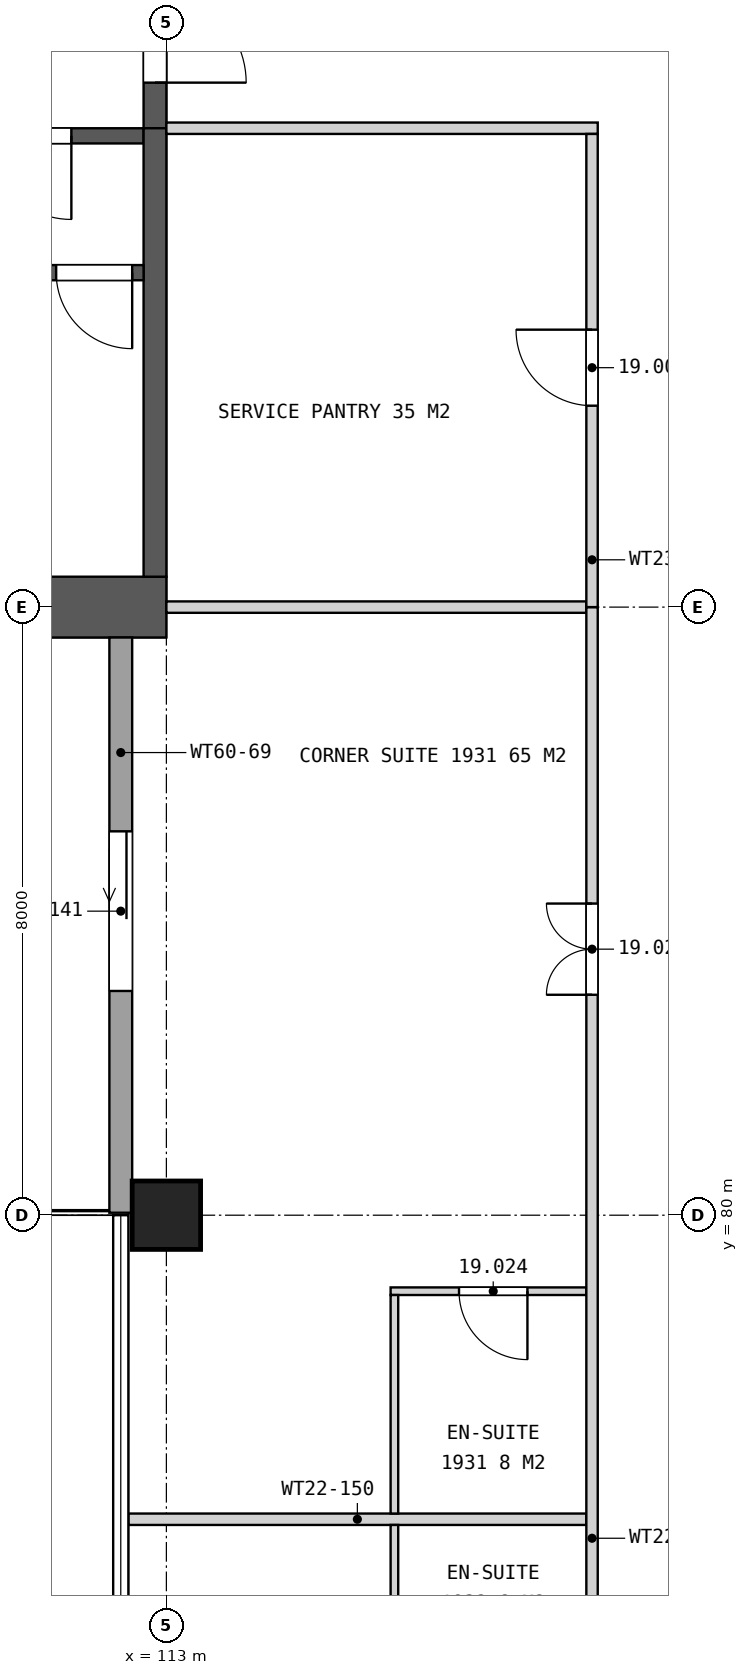
"""IFC4 building model, lengths in metres.
Left out: names, types, materials, properties, quantities, classifications, styles, units other than length and angle.
Written with IfcOpenShell. Run it as: python <this file> out.ifc"""

import sys

from ifc_helpers import new_model, si_unit, direction, frame, frame_2d, origin, origin_2d, place, context, subcontext, project, spatial, rectangle, extrude, element, fill, save


model = new_model("IFC4")
c1 = context("Model", 3, precision=1e-05, world=origin(), true_north=direction((0.0, 1.0)))
c2 = subcontext(c1, "Body", "Model", "MODEL_VIEW")
j1 = project(units=[si_unit("LENGTHUNIT", "METRE"), si_unit("PLANEANGLEUNIT", "RADIAN")], contexts=[c1])
p1 = place(None, origin())
s1 = spatial("IfcSite", under=j1, at=p1, CompositionType="ELEMENT")
p2 = place(p1, origin())
s2 = spatial("IfcBuilding", under=s1, at=p2, CompositionType="ELEMENT")
p3 = place(p2, frame((0.0, 0.0, 97.9)))
s3 = spatial("IfcBuildingStorey", under=s2, at=p3, CompositionType="ELEMENT", Elevation=97.9)
p4 = place(p3, frame((113.0, 80.0, 0.0), z_axis=(0.0, 0.0, 1.0), x_axis=(1.0, 0.0, 0.0)))
e1 = element("IfcColumn", 1, at=p4, inside=s3, PredefinedType="COLUMN", context=c2, shape_type="SweptSolid", body=[
    extrude(rectangle(XDim=0.9, YDim=0.9, at=origin_2d()), origin(), (0.0, 0.0, 1.0), 3.7),
])
p5 = place(p3, frame((113.0, 88.0, 0.0), z_axis=(0.0, 0.0, 1.0), x_axis=(-1.0, 0.0, 0.0)))
e2 = element("IfcWall", 2, at=p5, inside=s3, PredefinedType="SHEAR", context=c2, shape_type="SweptSolid", body=[
    extrude(rectangle(XDim=7.1, YDim=0.8, at=frame_2d((3.55, 0.0))), origin(), (0.0, 0.0, 1.0), 3.7),
])
p6 = place(p3, frame((112.85, 105.7, 0.0), z_axis=(0.0, 0.0, 1.0), x_axis=(0.0, -1.0, 0.0)))
e3 = element("IfcWall", 3, at=p6, inside=s3, PredefinedType="SHEAR", context=c2, shape_type="SweptSolid", body=[
    extrude(rectangle(XDim=11.4, YDim=0.3, at=frame_2d((5.7, 0.0))), origin(), (0.0, 0.0, 1.0), 3.7),
])
p7 = place(p6, frame((0.6, 0.0, 0.0)))
e4 = element("IfcOpeningElement", 4, at=p7, cuts=e3, PredefinedType="OPENING", context=c2, shape_type="SweptSolid", body=[
    extrude(rectangle(XDim=2.4, YDim=2.4, at=frame_2d((1.2, 1.2))), frame((0.0, 0.16, 0.0), z_axis=(0.0, -1.0, 0.0), x_axis=(1.0, 0.0, 0.0)), (0.0, 0.0, 1.0), 0.32),
])
p8 = place(p6, frame((4.5, 0.0, 0.0)))
e5 = element("IfcOpeningElement", 5, at=p8, cuts=e3, PredefinedType="OPENING", context=c2, shape_type="SweptSolid", body=[
    extrude(rectangle(XDim=2.4, YDim=2.4, at=frame_2d((1.2, 1.2))), frame((0.0, 0.16, 0.0), z_axis=(0.0, -1.0, 0.0), x_axis=(1.0, 0.0, 0.0)), (0.0, 0.0, 1.0), 0.32),
])
p9 = place(p6, frame((8.4, 0.0, 0.0)))
e6 = element("IfcOpeningElement", 6, at=p9, cuts=e3, PredefinedType="OPENING", context=c2, shape_type="SweptSolid", body=[
    extrude(rectangle(XDim=2.4, YDim=2.4, at=frame_2d((1.2, 1.2))), frame((0.0, 0.16, 0.0), z_axis=(0.0, -1.0, 0.0), x_axis=(1.0, 0.0, 0.0)), (0.0, 0.0, 1.0), 0.32),
])
p10 = place(p3, frame((112.7, 94.2, 0.0), z_axis=(0.0, 0.0, 1.0), x_axis=(-1.0, 0.0, 0.0)))
e7 = element("IfcWall", 7, at=p10, inside=s3, PredefinedType="SHEAR", context=c2, shape_type="SweptSolid", body=[
    extrude(rectangle(XDim=15.3, YDim=0.2, at=frame_2d((7.65, 0.0))), origin(), (0.0, 0.0, 1.0), 3.7),
])
p11 = place(p10, frame((0.95, 0.0, 0.0)))
e8 = element("IfcOpeningElement", 8, at=p11, cuts=e7, PredefinedType="OPENING", context=c2, shape_type="SweptSolid", body=[
    extrude(rectangle(XDim=1.1, YDim=2.1, at=frame_2d((0.55, 1.05))), frame((0.0, 0.11, 0.0), z_axis=(0.0, -1.0, 0.0), x_axis=(1.0, 0.0, 0.0)), (0.0, 0.0, 1.0), 0.22),
])
p12 = place(p3, frame((112.85, 94.3, 0.0), z_axis=(0.0, 0.0, 1.0), x_axis=(0.0, -1.0, 0.0)))
e9 = element("IfcWall", 9, at=p12, inside=s3, PredefinedType="SHEAR", context=c2, shape_type="SweptSolid", body=[
    extrude(rectangle(XDim=5.9, YDim=0.3, at=frame_2d((2.95, 0.0))), origin(), (0.0, 0.0, 1.0), 3.7),
])
p13 = place(p3, frame((112.7, 92.4, 0.0), z_axis=(0.0, 0.0, 1.0), x_axis=(-1.0, 0.0, 0.0)))
e10 = element("IfcWall", 10, at=p13, inside=s3, PredefinedType="SHEAR", context=c2, shape_type="SweptSolid", body=[
    extrude(rectangle(XDim=6.8, YDim=0.2, at=frame_2d((3.4, 0.0))), origin(), (0.0, 0.0, 1.0), 3.7),
])
p14 = place(p13, frame((0.15, 0.0, 0.0)))
e11 = element("IfcOpeningElement", 11, at=p14, cuts=e10, PredefinedType="OPENING", context=c2, shape_type="SweptSolid", body=[
    extrude(rectangle(XDim=1.0, YDim=2.1, at=frame_2d((0.5, 1.05))), frame((0.0, 0.11, 0.0), z_axis=(0.0, -1.0, 0.0), x_axis=(1.0, 0.0, 0.0)), (0.0, 0.0, 1.0), 0.22),
])
p15 = place(p3, frame((112.4, 87.6, 0.0), z_axis=(0.0, 0.0, 1.0), x_axis=(0.0, -1.0, 0.0)))
e12 = element("IfcWall", 12, at=p15, inside=s3, PredefinedType="SOLIDWALL", context=c2, shape_type="SweptSolid", body=[
    extrude(rectangle(XDim=7.568, YDim=0.3, at=frame_2d((3.784, 0.0))), origin(), (0.0, 0.0, 1.0), 3.42),
])
p16 = place(p15, frame((2.55, 0.0, 0.0)))
e13 = element("IfcOpeningElement", 13, at=p16, cuts=e12, PredefinedType="OPENING", context=c2, shape_type="SweptSolid", body=[
    extrude(rectangle(XDim=2.1, YDim=2.4, at=frame_2d((1.05, 1.2))), frame((0.0, 0.16, 0.0), z_axis=(0.0, -1.0, 0.0), x_axis=(1.0, 0.0, 0.0)), (0.0, 0.0, 1.0), 0.32),
])
p17 = place(p3, frame((112.5, 76.0, 0.0), z_axis=(0.0, 0.0, 1.0), x_axis=(1.0, 0.0, 0.0)))
e14 = element("IfcWall", 14, at=p17, inside=s3, PredefinedType="PARTITIONING", context=c2, shape_type="SweptSolid", body=[
    extrude(rectangle(XDim=6.025, YDim=0.15, at=frame_2d((3.012, 0.0))), origin(), (0.0, 0.0, 1.0), 2.963),
])
p18 = place(p3, frame((115.95, 79.0, 0.0), z_axis=(0.0, 0.0, 1.0), x_axis=(1.0, 0.0, 0.0)))
e15 = element("IfcWall", 15, at=p18, inside=s3, PredefinedType="PLUMBINGWALL", context=c2, shape_type="SweptSolid", body=[
    extrude(rectangle(XDim=2.575, YDim=0.1, at=frame_2d((1.288, 0.0))), origin(), (0.0, 0.0, 1.0), 3.7),
])
p19 = place(p18, frame((0.9, 0.0, 0.0)))
e16 = element("IfcOpeningElement", 16, at=p19, cuts=e15, PredefinedType="OPENING", context=c2, shape_type="SweptSolid", body=[
    extrude(rectangle(XDim=0.9, YDim=2.1, at=frame_2d((0.45, 1.05))), frame((0.0, 0.06, 0.0), z_axis=(0.0, -1.0, 0.0), x_axis=(1.0, 0.0, 0.0)), (0.0, 0.0, 1.0), 0.12),
])
p20 = place(p3, frame((113.0, 88.0, 0.0), z_axis=(0.0, 0.0, 1.0), x_axis=(1.0, 0.0, 0.0)))
e17 = element("IfcWall", 17, at=p20, inside=s3, PredefinedType="PARTITIONING", context=c2, shape_type="SweptSolid", body=[
    extrude(rectangle(XDim=5.525, YDim=0.15, at=frame_2d((2.762, 0.0))), origin(), (0.0, 0.0, 1.0), 2.957),
])
p21 = place(p3, frame((113.0, 94.3, 0.0), z_axis=(0.0, 0.0, 1.0), x_axis=(1.0, 0.0, 0.0)))
e18 = element("IfcWall", 18, at=p21, inside=s3, PredefinedType="PARTITIONING", context=c2, shape_type="SweptSolid", body=[
    extrude(rectangle(XDim=5.675, YDim=0.15, at=frame_2d((2.837, 0.0))), origin(), (0.0, 0.0, 1.0), 3.7),
])
for number, where, z_axis, x_axis in (
    (19, (116.0, 73.05, 0.0), (0.0, 0.0, 1.0), (0.0, 1.0, 0.0)),
    (20, (116.0, 76.075, 0.0), (0.0, 0.0, 1.0), (0.0, 1.0, 0.0)),
):
    element("IfcWall", number, at=place(p3, frame(where, z_axis=z_axis, x_axis=x_axis)), inside=s3, PredefinedType="PLUMBINGWALL", context=c2, shape_type="SweptSolid", body=[
        extrude(rectangle(XDim=2.875, YDim=0.1, at=frame_2d((1.438, 0.0))), origin(), (0.0, 0.0, 1.0), 3.7),
    ])
p22 = place(p3, frame((118.6, 63.5, 0.0), z_axis=(0.0, 0.0, 1.0), x_axis=(0.0, 1.0, 0.0)))
e21 = element("IfcWall", 21, at=p22, inside=s3, PredefinedType="PARTITIONING", context=c2, shape_type="SweptSolid", body=[
    extrude(rectangle(XDim=24.5, YDim=0.15, at=frame_2d((12.25, 0.0))), origin(), (0.0, 0.0, 1.0), 2.957),
])
p23 = place(p22, frame((19.4, 0.0, 0.0)))
e22 = element("IfcOpeningElement", 22, at=p23, cuts=e21, PredefinedType="OPENING", context=c2, shape_type="SweptSolid", body=[
    extrude(rectangle(XDim=1.2, YDim=2.2, at=frame_2d((0.6, 1.1))), frame((0.0, 0.085, 0.0), z_axis=(0.0, -1.0, 0.0), x_axis=(1.0, 0.0, 0.0)), (0.0, 0.0, 1.0), 0.17),
])
p24 = place(p22, frame((4.4, 0.0, 0.0)))
e23 = element("IfcOpeningElement", 23, at=p24, cuts=e21, PredefinedType="OPENING", context=c2, shape_type="SweptSolid", body=[
    extrude(rectangle(XDim=1.2, YDim=2.2, at=frame_2d((0.6, 1.1))), frame((0.0, 0.085, 0.0), z_axis=(0.0, -1.0, 0.0), x_axis=(1.0, 0.0, 0.0)), (0.0, 0.0, 1.0), 0.17),
])
p25 = place(p3, frame((118.6, 88.0, 0.0), z_axis=(0.0, 0.0, 1.0), x_axis=(0.0, 1.0, 0.0)))
e24 = element("IfcWall", 24, at=p25, inside=s3, PredefinedType="PARTITIONING", context=c2, shape_type="SweptSolid", body=[
    extrude(rectangle(XDim=6.225, YDim=0.15, at=frame_2d((3.113, 0.0))), origin(), (0.0, 0.0, 1.0), 2.957),
])
p26 = place(p25, frame((2.65, 0.0, 0.0)))
e25 = element("IfcOpeningElement", 25, at=p26, cuts=e24, PredefinedType="OPENING", context=c2, shape_type="SweptSolid", body=[
    extrude(rectangle(XDim=1.0, YDim=2.1, at=frame_2d((0.5, 1.05))), frame((0.0, 0.085, 0.0), z_axis=(0.0, -1.0, 0.0), x_axis=(1.0, 0.0, 0.0)), (0.0, 0.0, 1.0), 0.17),
])
p27 = place(p9, origin())
e26 = element("IfcDoor", 26, at=p27, inside=s3, OperationType="DOUBLE_DOOR_SINGLE_SWING", PredefinedType="DOOR", context=c2, shape_type="SweptSolid", body=[
    extrude(rectangle(XDim=2.4, YDim=2.4, at=frame_2d((1.2, 1.2))), frame((0.0, 0.025, 0.0), z_axis=(0.0, -1.0, 0.0), x_axis=(1.0, 0.0, 0.0)), (0.0, 0.0, 1.0), 0.05),
])
fill(e6, e26)
p28 = place(p11, origin())
e27 = element("IfcDoor", 27, at=p28, inside=s3, OperationType="SINGLE_SWING_LEFT", PredefinedType="DOOR", context=c2, shape_type="SweptSolid", body=[
    extrude(rectangle(XDim=1.1, YDim=2.1, at=frame_2d((0.55, 1.05))), frame((0.0, 0.025, 0.0), z_axis=(0.0, -1.0, 0.0), x_axis=(1.0, 0.0, 0.0)), (0.0, 0.0, 1.0), 0.05),
])
fill(e8, e27)
p29 = place(p14, origin())
e28 = element("IfcDoor", 28, at=p29, inside=s3, OperationType="SINGLE_SWING_LEFT", PredefinedType="DOOR", context=c2, shape_type="SweptSolid", body=[
    extrude(rectangle(XDim=1.0, YDim=2.1, at=frame_2d((0.5, 1.05))), frame((0.0, 0.025, 0.0), z_axis=(0.0, -1.0, 0.0), x_axis=(1.0, 0.0, 0.0)), (0.0, 0.0, 1.0), 0.05),
])
fill(e11, e28)
p30 = place(p16, frame((2.1, 0.0, 0.0), z_axis=(0.0, 0.0, 1.0), x_axis=(-1.0, 0.0, 0.0)))
e29 = element("IfcDoor", 29, at=p30, inside=s3, OperationType="SLIDING_TO_LEFT", PredefinedType="DOOR", context=c2, shape_type="SweptSolid", body=[
    extrude(rectangle(XDim=2.1, YDim=2.4, at=frame_2d((1.05, 1.2))), frame((0.0, 0.025, 0.0), z_axis=(0.0, -1.0, 0.0), x_axis=(1.0, 0.0, 0.0)), (0.0, 0.0, 1.0), 0.05),
])
fill(e13, e29)
p31 = place(p26, origin())
e30 = element("IfcDoor", 30, at=p31, inside=s3, OperationType="SINGLE_SWING_RIGHT", PredefinedType="DOOR", context=c2, shape_type="SweptSolid", body=[
    extrude(rectangle(XDim=1.0, YDim=2.1, at=frame_2d((0.5, 1.05))), frame((0.0, 0.025, 0.0), z_axis=(0.0, -1.0, 0.0), x_axis=(1.0, 0.0, 0.0)), (0.0, 0.0, 1.0), 0.05),
])
fill(e25, e30)
p32 = place(p23, origin())
e31 = element("IfcDoor", 31, at=p32, inside=s3, OperationType="DOUBLE_DOOR_SINGLE_SWING", PredefinedType="DOOR", context=c2, shape_type="SweptSolid", body=[
    extrude(rectangle(XDim=1.2, YDim=2.2, at=frame_2d((0.6, 1.1))), frame((0.0, 0.025, 0.0), z_axis=(0.0, -1.0, 0.0), x_axis=(1.0, 0.0, 0.0)), (0.0, 0.0, 1.0), 0.05),
])
fill(e22, e31)
p33 = place(p19, frame((0.9, 0.0, 0.0), z_axis=(0.0, 0.0, 1.0), x_axis=(-1.0, 0.0, 0.0)))
e32 = element("IfcDoor", 32, at=p33, inside=s3, OperationType="SINGLE_SWING_LEFT", PredefinedType="DOOR", context=c2, shape_type="SweptSolid", body=[
    extrude(rectangle(XDim=0.9, YDim=2.1, at=frame_2d((0.45, 1.05))), frame((0.0, 0.025, 0.0), z_axis=(0.0, -1.0, 0.0), x_axis=(1.0, 0.0, 0.0)), (0.0, 0.0, 1.0), 0.05),
])
fill(e16, e32)
save(model, sys.argv[1])
